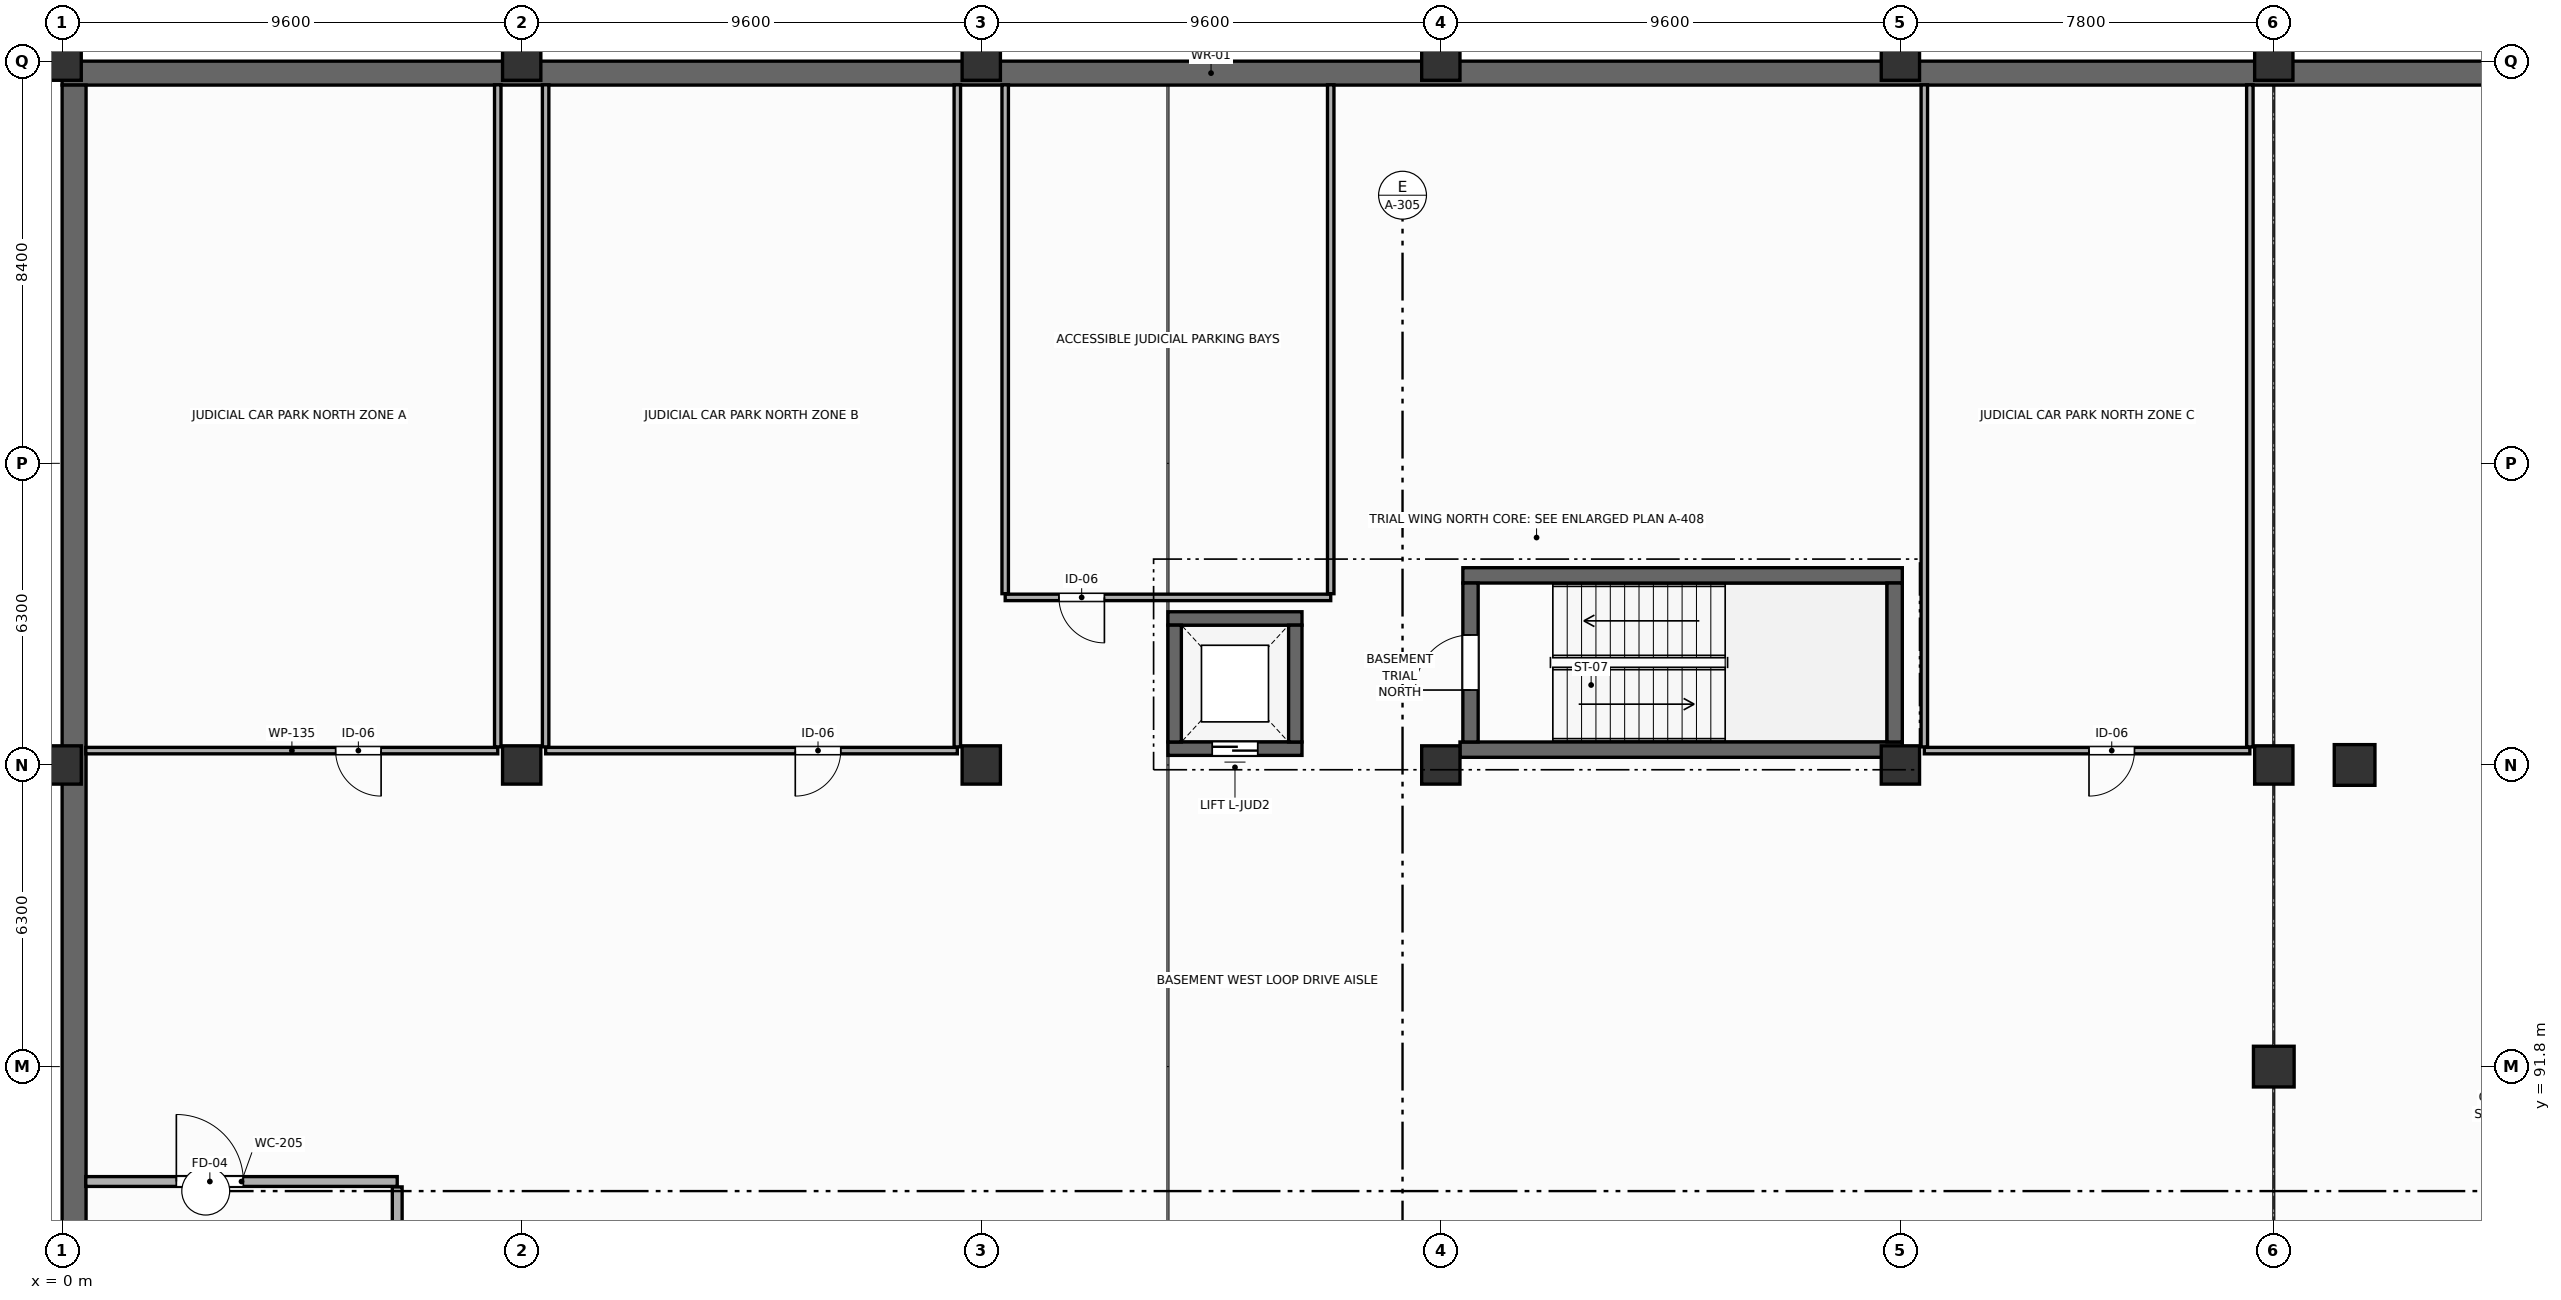
"""IFC4 building model, lengths in metres.
Left out: names, types, materials, properties, quantities, classifications, styles, units other than length and angle.
Written with IfcOpenShell. Run it as: python <this file> out.ifc"""

import sys

from ifc_helpers import new_model, si_unit, direction, frame, frame_2d, origin, origin_2d, place, context, subcontext, project, spatial, rectangle, circle, extrude, element, fill, save


model = new_model("IFC4")
c1 = context("Model", 3, precision=1e-05, world=origin(), true_north=direction((0.0, 1.0)))
c2 = subcontext(c1, "Body", "Model", "MODEL_VIEW")
j1 = project(units=[si_unit("LENGTHUNIT", "METRE"), si_unit("PLANEANGLEUNIT", "RADIAN")], contexts=[c1])
p1 = place(None, origin())
s1 = spatial("IfcSite", under=j1, at=p1, CompositionType="ELEMENT")
p2 = place(p1, origin())
s2 = spatial("IfcBuilding", under=s1, at=p2, CompositionType="ELEMENT")
p3 = place(p2, frame((0.0, 0.0, -4.8)))
s3 = spatial("IfcBuildingStorey", under=s2, at=p3, CompositionType="ELEMENT", Elevation=-4.8)
for number, where, z_axis, x_axis in (
    (1, (47.888, 98.1, -0.42), (0.0, 0.0, 1.0), (1.0, 0.0, 0.0)),
    (2, (46.2, 91.8, -0.42), (0.0, 0.0, 1.0), (1.0, 0.0, 0.0)),
):
    element("IfcColumn", number, at=place(p3, frame(where, z_axis=z_axis, x_axis=x_axis)), inside=s3, PredefinedType="COLUMN", context=c2, shape_type="SweptSolid", body=[
        extrude(circle(Radius=0.425, at=origin_2d()), origin(), (0.0, 0.0, 1.0), 5.22),
    ])
for number, where, z_axis, x_axis in (
    (3, (0.0, 98.1, -0.42), (0.0, 0.0, 1.0), (1.0, 0.0, 0.0)),
    (4, (0.0, 112.8, -0.42), (0.0, 0.0, 1.0), (1.0, 0.0, 0.0)),
    (5, (9.6, 98.1, -0.42), (0.0, 0.0, 1.0), (1.0, 0.0, 0.0)),
    (6, (9.6, 112.8, -0.42), (0.0, 0.0, 1.0), (1.0, 0.0, 0.0)),
    (7, (19.2, 98.1, -0.42), (0.0, 0.0, 1.0), (1.0, 0.0, 0.0)),
    (8, (19.2, 112.8, -0.42), (0.0, 0.0, 1.0), (1.0, 0.0, 0.0)),
    (9, (28.8, 98.1, -0.42), (0.0, 0.0, 1.0), (1.0, 0.0, 0.0)),
    (10, (28.8, 112.8, -0.42), (0.0, 0.0, 1.0), (1.0, 0.0, 0.0)),
    (11, (38.4, 98.1, -0.42), (0.0, 0.0, 1.0), (1.0, 0.0, 0.0)),
    (12, (38.4, 112.8, -0.42), (0.0, 0.0, 1.0), (1.0, 0.0, 0.0)),
    (13, (46.2, 98.1, -0.42), (0.0, 0.0, 1.0), (1.0, 0.0, 0.0)),
    (14, (46.2, 112.8, -0.42), (0.0, 0.0, 1.0), (1.0, 0.0, 0.0)),
):
    element("IfcColumn", number, at=place(p3, frame(where, z_axis=z_axis, x_axis=x_axis)), inside=s3, PredefinedType="COLUMN", context=c2, shape_type="SweptSolid", body=[
        extrude(rectangle(XDim=0.8, YDim=0.8, at=origin_2d()), origin(), (0.0, 0.0, 1.0), 5.22),
    ])
p4 = place(p3, frame((0.0, 112.55, -0.42), z_axis=(0.0, 0.0, 1.0), x_axis=(1.0, 0.0, 0.0)))
e15 = element("IfcWall", 15, at=p4, inside=s3, PredefinedType="SOLIDWALL", context=c2, shape_type="SweptSolid", body=[
    extrude(rectangle(XDim=58.8, YDim=0.5, at=frame_2d((29.4, 0.0))), origin(), (0.0, 0.0, 1.0), 4.87),
])
p5 = place(p3, frame((0.25, 0.0, -0.42), z_axis=(0.0, 0.0, 1.0), x_axis=(0.0, 1.0, 0.0)))
e16 = element("IfcWall", 16, at=p5, inside=s3, PredefinedType="SOLIDWALL", context=c2, shape_type="SweptSolid", body=[
    extrude(rectangle(XDim=112.3, YDim=0.5, at=frame_2d((56.15, 0.0))), origin(), (0.0, 0.0, 1.0), 4.87),
])
p6 = place(p3, frame((29.26, 102.06, -0.42), z_axis=(0.0, 0.0, 1.0), x_axis=(1.0, 0.0, 0.0)))
e17 = element("IfcWall", 17, at=p6, inside=s3, PredefinedType="SHEAR", context=c2, shape_type="SweptSolid", body=[
    extrude(rectangle(XDim=9.18, YDim=0.32, at=frame_2d((4.59, 0.0))), origin(), (0.0, 0.0, 1.0), 4.94),
])
p7 = place(p3, frame((38.44, 98.42, -0.42), z_axis=(0.0, 0.0, 1.0), x_axis=(-1.0, 0.0, 0.0)))
e18 = element("IfcWall", 18, at=p7, inside=s3, PredefinedType="SHEAR", context=c2, shape_type="SweptSolid", body=[
    extrude(rectangle(XDim=9.24, YDim=0.32, at=frame_2d((4.62, 0.0))), origin(), (0.0, 0.0, 1.0), 4.94),
])
p8 = place(p3, frame((29.42, 98.58, -0.42), z_axis=(0.0, 0.0, 1.0), x_axis=(0.0, 1.0, 0.0)))
e19 = element("IfcWall", 19, at=p8, inside=s3, PredefinedType="SHEAR", context=c2, shape_type="SweptSolid", body=[
    extrude(rectangle(XDim=3.32, YDim=0.32, at=frame_2d((1.66, 0.0))), origin(), (0.0, 0.0, 1.0), 4.94),
])
p9 = place(p8, frame((1.085, 0.0, 0.42)))
e20 = element("IfcOpeningElement", 20, at=p9, cuts=e19, PredefinedType="OPENING", context=c2, shape_type="SweptSolid", body=[
    extrude(rectangle(XDim=1.15, YDim=2.2, at=frame_2d((0.575, 1.1))), frame((0.0, 0.17, 0.0), z_axis=(0.0, -1.0, 0.0), x_axis=(1.0, 0.0, 0.0)), (0.0, 0.0, 1.0), 0.34),
])
p10 = place(p3, frame((38.28, 101.9, -0.42), z_axis=(0.0, 0.0, 1.0), x_axis=(0.0, -1.0, 0.0)))
e21 = element("IfcWall", 21, at=p10, inside=s3, PredefinedType="SHEAR", context=c2, shape_type="SweptSolid", body=[
    extrude(rectangle(XDim=3.32, YDim=0.32, at=frame_2d((1.66, 0.0))), origin(), (0.0, 0.0, 1.0), 4.94),
])
p11 = place(p3, frame((23.1, 101.16, -0.42), z_axis=(0.0, 0.0, 1.0), x_axis=(1.0, 0.0, 0.0)))
e22 = element("IfcWall", 22, at=p11, inside=s3, PredefinedType="SHEAR", context=c2, shape_type="SweptSolid", body=[
    extrude(rectangle(XDim=2.8, YDim=0.28, at=frame_2d((1.4, 0.0))), origin(), (0.0, 0.0, 1.0), 4.94),
])
p12 = place(p3, frame((25.9, 98.44, -0.42), z_axis=(0.0, 0.0, 1.0), x_axis=(-1.0, 0.0, 0.0)))
e23 = element("IfcWall", 23, at=p12, inside=s3, PredefinedType="SHEAR", context=c2, shape_type="SweptSolid", body=[
    extrude(rectangle(XDim=2.8, YDim=0.28, at=frame_2d((1.4, 0.0))), origin(), (0.0, 0.0, 1.0), 4.94),
])
p13 = place(p12, frame((0.925, 0.0, 0.42)))
e24 = element("IfcOpeningElement", 24, at=p13, cuts=e23, PredefinedType="OPENING", context=c2, shape_type="SweptSolid", body=[
    extrude(rectangle(XDim=0.95, YDim=2.15, at=frame_2d((0.475, 1.075))), frame((0.0, 0.15, 0.0), z_axis=(0.0, -1.0, 0.0), x_axis=(1.0, 0.0, 0.0)), (0.0, 0.0, 1.0), 0.3),
])
for number, where, z_axis, x_axis in (
    (25, (23.24, 98.58, -0.42), (0.0, 0.0, 1.0), (0.0, 1.0, 0.0)),
    (26, (25.76, 101.02, -0.42), (0.0, 0.0, 1.0), (0.0, -1.0, 0.0)),
):
    element("IfcWall", number, at=place(p3, frame(where, z_axis=z_axis, x_axis=x_axis)), inside=s3, PredefinedType="SHEAR", context=c2, shape_type="SweptSolid", body=[
        extrude(rectangle(XDim=2.44, YDim=0.28, at=frame_2d((1.22, 0.0))), origin(), (0.0, 0.0, 1.0), 4.94),
    ])
p14 = place(p3, frame((9.1, 98.4, 0.0), z_axis=(0.0, 0.0, 1.0), x_axis=(-1.0, 0.0, 0.0)))
e27 = element("IfcWall", 27, at=p14, inside=s3, PredefinedType="PARTITIONING", context=c2, shape_type="SweptSolid", body=[
    extrude(rectangle(XDim=8.606, YDim=0.135, at=frame_2d((4.303, 0.0))), origin(), (0.0, 0.0, 1.0), 3.6),
])
p15 = place(p14, frame((2.437, 0.0, 0.0)))
e28 = element("IfcOpeningElement", 28, at=p15, cuts=e27, PredefinedType="OPENING", context=c2, shape_type="SweptSolid", body=[
    extrude(rectangle(XDim=0.95, YDim=2.15, at=frame_2d((0.475, 1.075))), frame((0.0, 0.077, 0.0), z_axis=(0.0, -1.0, 0.0), x_axis=(1.0, 0.0, 0.0)), (0.0, 0.0, 1.0), 0.155),
])
p16 = place(p3, frame((9.1, 112.306, 0.0), z_axis=(0.0, 0.0, 1.0), x_axis=(0.0, -1.0, 0.0)))
e29 = element("IfcWall", 29, at=p16, inside=s3, PredefinedType="PARTITIONING", context=c2, shape_type="SweptSolid", body=[
    extrude(rectangle(XDim=13.828, YDim=0.135, at=frame_2d((6.914, 0.0))), origin(), (0.0, 0.0, 1.0), 3.6),
])
p17 = place(p3, frame((18.7, 98.4, 0.0), z_axis=(0.0, 0.0, 1.0), x_axis=(-1.0, 0.0, 0.0)))
e30 = element("IfcWall", 30, at=p17, inside=s3, PredefinedType="PARTITIONING", context=c2, shape_type="SweptSolid", body=[
    extrude(rectangle(XDim=8.6, YDim=0.135, at=frame_2d((4.3, 0.0))), origin(), (0.0, 0.0, 1.0), 3.6),
])
p18 = place(p17, frame((2.435, 0.0, 0.0)))
e31 = element("IfcOpeningElement", 31, at=p18, cuts=e30, PredefinedType="OPENING", context=c2, shape_type="SweptSolid", body=[
    extrude(rectangle(XDim=0.95, YDim=2.15, at=frame_2d((0.475, 1.075))), frame((0.0, 0.077, 0.0), z_axis=(0.0, -1.0, 0.0), x_axis=(1.0, 0.0, 0.0)), (0.0, 0.0, 1.0), 0.155),
])
for number, where, z_axis, x_axis in (
    (32, (10.1, 98.478, 0.0), (0.0, 0.0, 1.0), (0.0, 1.0, 0.0)),
    (33, (18.7, 112.306, 0.0), (0.0, 0.0, 1.0), (0.0, -1.0, 0.0)),
):
    element("IfcWall", number, at=place(p3, frame(where, z_axis=z_axis, x_axis=x_axis)), inside=s3, PredefinedType="PARTITIONING", context=c2, shape_type="SweptSolid", body=[
        extrude(rectangle(XDim=13.828, YDim=0.135, at=frame_2d((6.914, 0.0))), origin(), (0.0, 0.0, 1.0), 3.6),
    ])
p19 = place(p3, frame((26.5, 101.6, 0.0), z_axis=(0.0, 0.0, 1.0), x_axis=(-1.0, 0.0, 0.0)))
e34 = element("IfcWall", 34, at=p19, inside=s3, PredefinedType="PARTITIONING", context=c2, shape_type="SweptSolid", body=[
    extrude(rectangle(XDim=6.8, YDim=0.135, at=frame_2d((3.4, 0.0))), origin(), (0.0, 0.0, 1.0), 3.6),
])
p20 = place(p19, frame((4.728, 0.0, 0.0)))
e35 = element("IfcOpeningElement", 35, at=p20, cuts=e34, PredefinedType="OPENING", context=c2, shape_type="SweptSolid", body=[
    extrude(rectangle(XDim=0.95, YDim=2.15, at=frame_2d((0.475, 1.075))), frame((0.0, 0.077, 0.0), z_axis=(0.0, -1.0, 0.0), x_axis=(1.0, 0.0, 0.0)), (0.0, 0.0, 1.0), 0.155),
])
p21 = place(p3, frame((19.7, 101.677, 0.0), z_axis=(0.0, 0.0, 1.0), x_axis=(0.0, 1.0, 0.0)))
e36 = element("IfcWall", 36, at=p21, inside=s3, PredefinedType="PARTITIONING", context=c2, shape_type="SweptSolid", body=[
    extrude(rectangle(XDim=10.628, YDim=0.135, at=frame_2d((5.314, 0.0))), origin(), (0.0, 0.0, 1.0), 3.6),
])
p22 = place(p3, frame((26.5, 112.306, 0.0), z_axis=(0.0, 0.0, 1.0), x_axis=(0.0, -1.0, 0.0)))
e37 = element("IfcWall", 37, at=p22, inside=s3, PredefinedType="PARTITIONING", context=c2, shape_type="SweptSolid", body=[
    extrude(rectangle(XDim=10.628, YDim=0.135, at=frame_2d((5.314, 0.0))), origin(), (0.0, 0.0, 1.0), 3.9),
])
p23 = place(p3, frame((45.7, 98.4, 0.0), z_axis=(0.0, 0.0, 1.0), x_axis=(-1.0, 0.0, 0.0)))
e38 = element("IfcWall", 38, at=p23, inside=s3, PredefinedType="PARTITIONING", context=c2, shape_type="SweptSolid", body=[
    extrude(rectangle(XDim=6.8, YDim=0.135, at=frame_2d((3.4, 0.0))), origin(), (0.0, 0.0, 1.0), 3.6),
])
p24 = place(p23, frame((2.41, 0.0, 0.0)))
e39 = element("IfcOpeningElement", 39, at=p24, cuts=e38, PredefinedType="OPENING", context=c2, shape_type="SweptSolid", body=[
    extrude(rectangle(XDim=0.95, YDim=2.15, at=frame_2d((0.475, 1.075))), frame((0.0, 0.077, 0.0), z_axis=(0.0, -1.0, 0.0), x_axis=(1.0, 0.0, 0.0)), (0.0, 0.0, 1.0), 0.155),
])
for number, where, z_axis, x_axis in (
    (40, (38.9, 98.478, 0.0), (0.0, 0.0, 1.0), (0.0, 1.0, 0.0)),
    (41, (45.7, 112.306, 0.0), (0.0, 0.0, 1.0), (0.0, -1.0, 0.0)),
):
    element("IfcWall", number, at=place(p3, frame(where, z_axis=z_axis, x_axis=x_axis)), inside=s3, PredefinedType="PARTITIONING", context=c2, shape_type="SweptSolid", body=[
        extrude(rectangle(XDim=13.828, YDim=0.135, at=frame_2d((6.914, 0.0))), origin(), (0.0, 0.0, 1.0), 3.6),
    ])
p25 = place(p3, frame((0.494, 89.4, 0.0), z_axis=(0.0, 0.0, 1.0), x_axis=(1.0, 0.0, 0.0)))
e42 = element("IfcWall", 42, at=p25, inside=s3, PredefinedType="STANDARD", context=c2, shape_type="SweptSolid", body=[
    extrude(rectangle(XDim=6.506, YDim=0.205, at=frame_2d((3.253, 0.0))), origin(), (0.0, 0.0, 1.0), 3.65),
])
p26 = place(p25, frame((1.892, 0.0, 0.0)))
e43 = element("IfcOpeningElement", 43, at=p26, cuts=e42, PredefinedType="OPENING", context=c2, shape_type="SweptSolid", body=[
    extrude(rectangle(XDim=1.4, YDim=2.25, at=frame_2d((0.7, 1.125))), frame((0.0, 0.113, 0.0), z_axis=(0.0, -1.0, 0.0), x_axis=(1.0, 0.0, 0.0)), (0.0, 0.0, 1.0), 0.225),
])
p27 = place(p3, frame((7.0, 89.288, 0.0), z_axis=(0.0, 0.0, 1.0), x_axis=(0.0, -1.0, 0.0)))
e44 = element("IfcWall", 44, at=p27, inside=s3, PredefinedType="STANDARD", context=c2, shape_type="SweptSolid", body=[
    extrude(rectangle(XDim=21.619, YDim=0.205, at=frame_2d((10.809, 0.0))), origin(), (0.0, 0.0, 1.0), 3.69),
])
p28 = place(p9, origin())
e45 = element("IfcDoor", 45, at=p28, inside=s3, OperationType="SINGLE_SWING_LEFT", PredefinedType="DOOR", context=c2, shape_type="SweptSolid", body=[
    extrude(rectangle(XDim=1.15, YDim=2.2, at=frame_2d((0.575, 1.1))), frame((0.0, 0.025, 0.0), z_axis=(0.0, -1.0, 0.0), x_axis=(1.0, 0.0, 0.0)), (0.0, 0.0, 1.0), 0.05),
])
fill(e20, e45)
p29 = place(p13, origin())
e46 = element("IfcDoor", 46, at=p29, inside=s3, OperationType="DOUBLE_DOOR_SLIDING", PredefinedType="DOOR", context=c2, shape_type="SweptSolid", body=[
    extrude(rectangle(XDim=0.95, YDim=2.15, at=frame_2d((0.475, 1.075))), frame((0.0, 0.025, 0.0), z_axis=(0.0, -1.0, 0.0), x_axis=(1.0, 0.0, 0.0)), (0.0, 0.0, 1.0), 0.05),
])
fill(e24, e46)
p30 = place(p15, origin())
e47 = element("IfcDoor", 47, at=p30, inside=s3, OperationType="SINGLE_SWING_LEFT", PredefinedType="DOOR", context=c2, shape_type="SweptSolid", body=[
    extrude(rectangle(XDim=0.95, YDim=2.15, at=frame_2d((0.475, 1.075))), frame((0.0, 0.025, 0.0), z_axis=(0.0, -1.0, 0.0), x_axis=(1.0, 0.0, 0.0)), (0.0, 0.0, 1.0), 0.05),
])
fill(e28, e47)
p31 = place(p18, origin())
e48 = element("IfcDoor", 48, at=p31, inside=s3, OperationType="SINGLE_SWING_RIGHT", PredefinedType="DOOR", context=c2, shape_type="SweptSolid", body=[
    extrude(rectangle(XDim=0.95, YDim=2.15, at=frame_2d((0.475, 1.075))), frame((0.0, 0.025, 0.0), z_axis=(0.0, -1.0, 0.0), x_axis=(1.0, 0.0, 0.0)), (0.0, 0.0, 1.0), 0.05),
])
fill(e31, e48)
p32 = place(p20, origin())
e49 = element("IfcDoor", 49, at=p32, inside=s3, OperationType="SINGLE_SWING_LEFT", PredefinedType="DOOR", context=c2, shape_type="SweptSolid", body=[
    extrude(rectangle(XDim=0.95, YDim=2.15, at=frame_2d((0.475, 1.075))), frame((0.0, 0.025, 0.0), z_axis=(0.0, -1.0, 0.0), x_axis=(1.0, 0.0, 0.0)), (0.0, 0.0, 1.0), 0.05),
])
fill(e35, e49)
p33 = place(p24, origin())
e50 = element("IfcDoor", 50, at=p33, inside=s3, OperationType="SINGLE_SWING_RIGHT", PredefinedType="DOOR", context=c2, shape_type="SweptSolid", body=[
    extrude(rectangle(XDim=0.95, YDim=2.15, at=frame_2d((0.475, 1.075))), frame((0.0, 0.025, 0.0), z_axis=(0.0, -1.0, 0.0), x_axis=(1.0, 0.0, 0.0)), (0.0, 0.0, 1.0), 0.05),
])
fill(e39, e50)
p34 = place(p26, origin())
e51 = element("IfcDoor", 51, at=p34, inside=s3, OperationType="SINGLE_SWING_LEFT", PredefinedType="DOOR", context=c2, shape_type="SweptSolid", body=[
    extrude(rectangle(XDim=1.4, YDim=2.25, at=frame_2d((0.7, 1.125))), frame((0.0, 0.025, 0.0), z_axis=(0.0, -1.0, 0.0), x_axis=(1.0, 0.0, 0.0)), (0.0, 0.0, 1.0), 0.05),
])
fill(e43, e51)
save(model, sys.argv[1])
